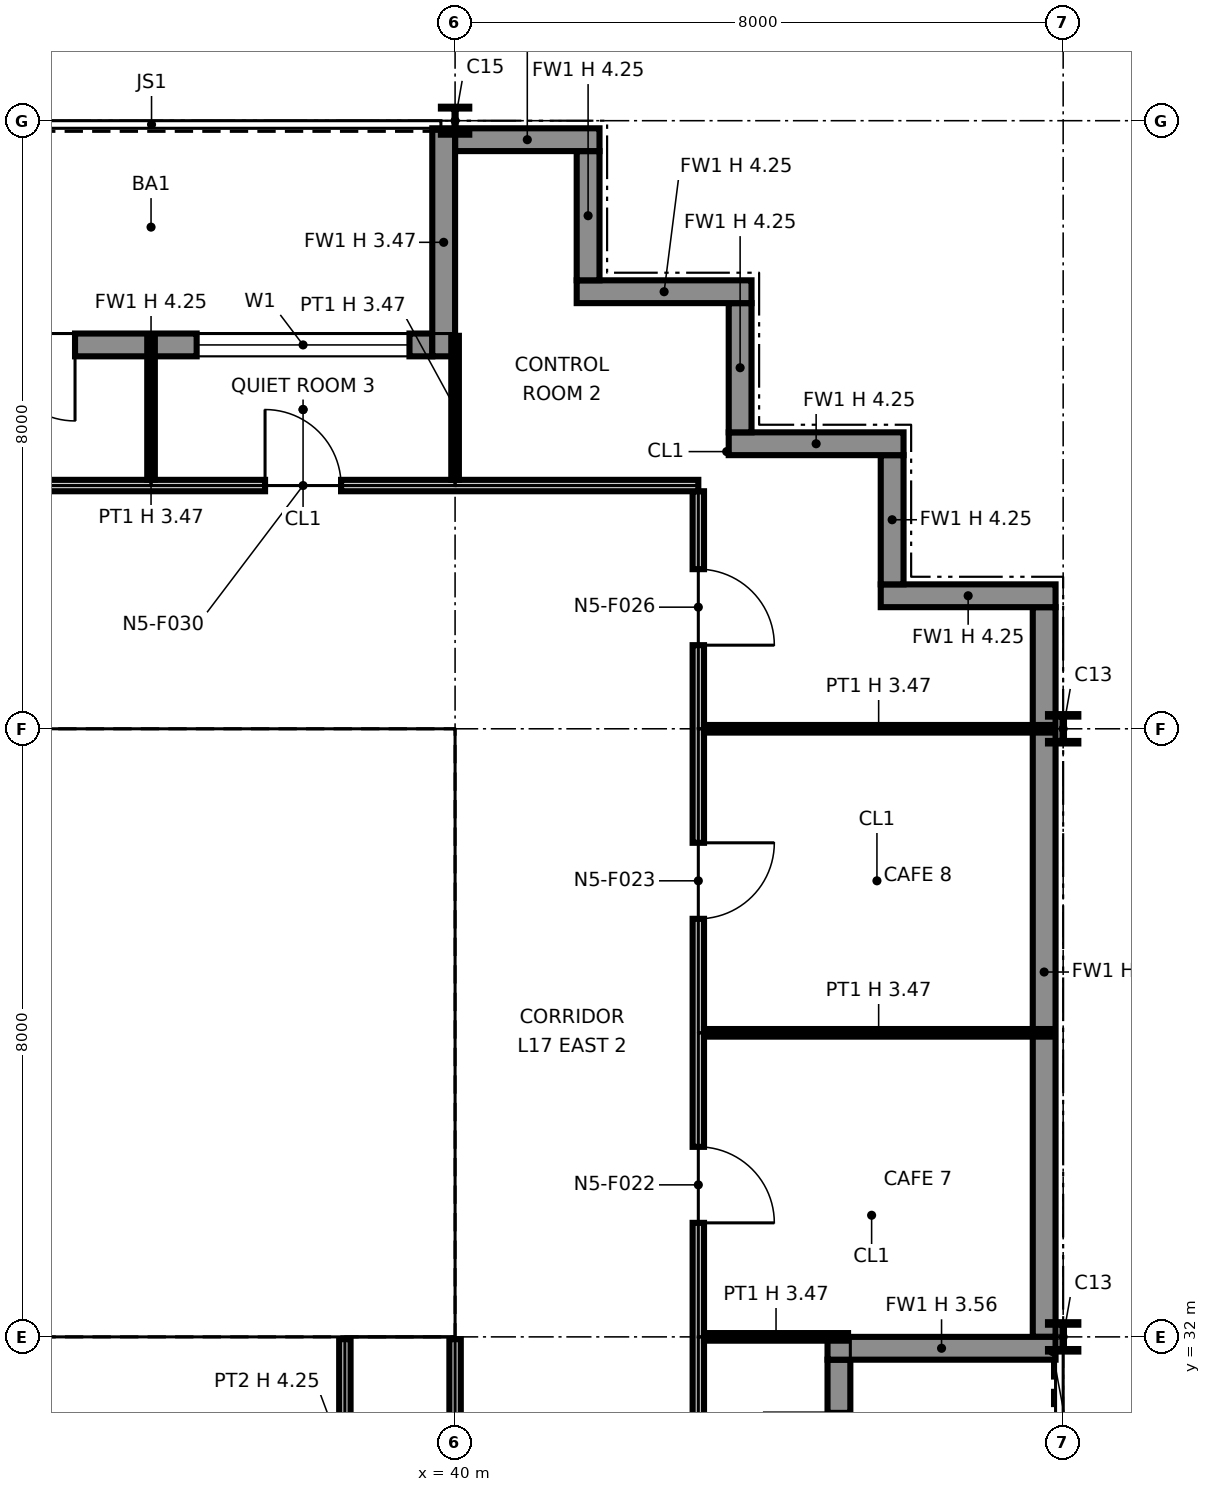
"""IFC4 building model, lengths in metres.
Left out: names, types, materials, properties, quantities, classifications, styles, units other than length and angle.
Written with IfcOpenShell. Run it as: python <this file> out.ifc"""

import sys

from ifc_helpers import new_model, si_unit, direction, frame, frame_2d, origin, origin_2d, place, context, subcontext, project, spatial, polyline, rectangle, i_section, outline, extrude, element, fill, save


model = new_model("IFC4")
c1 = context("Model", 3, precision=1e-05, world=origin(), true_north=direction((0.0, 1.0)))
c2 = subcontext(c1, "Body", "Model", "MODEL_VIEW")
j1 = project(units=[si_unit("LENGTHUNIT", "METRE"), si_unit("PLANEANGLEUNIT", "RADIAN")], contexts=[c1])
p1 = place(None, origin())
s1 = spatial("IfcSite", under=j1, at=p1, CompositionType="ELEMENT")
p2 = place(p1, origin())
s2 = spatial("IfcBuilding", under=s1, at=p2, CompositionType="ELEMENT")
p3 = place(p2, frame((0.0, 0.0, 92.0)))
s3 = spatial("IfcBuildingStorey", under=s2, at=p3, CompositionType="ELEMENT", Elevation=92.0)
for number, where, z_axis, x_axis in (
    (1, (40.0, 32.0, 0.0), (0.0, 0.0, 1.0), (1.0, 0.0, 0.0)),
    (2, (40.0, 40.0, 0.0), (0.0, 0.0, 1.0), (1.0, 0.0, 0.0)),
):
    element("IfcColumn", number, at=place(p3, frame(where, z_axis=z_axis, x_axis=x_axis)), inside=s3, PredefinedType="COLUMN", context=c2, shape_type="SweptSolid", body=[
        extrude(i_section(OverallWidth=0.257, OverallDepth=0.363, WebThickness=0.013, FlangeThickness=0.022, at=origin_2d()), origin(), (0.0, 0.0, 1.0), 4.25),
    ])
p4 = place(p3, frame((40.0, 48.0, 0.0), z_axis=(0.0, 0.0, 1.0), x_axis=(1.0, 0.0, 0.0)))
e3 = element("IfcColumn", 3, at=p4, inside=s3, PredefinedType="COLUMN", context=c2, shape_type="SweptSolid", body=[
    extrude(i_section(OverallWidth=0.373, OverallDepth=0.368, WebThickness=0.015, FlangeThickness=0.024, at=origin_2d()), origin(), (0.0, 0.0, 1.0), 4.25),
])
for number, where, z_axis, x_axis in (
    (4, (48.0, 32.0, 0.0), (0.0, 0.0, 1.0), (1.0, 0.0, 0.0)),
    (5, (48.0, 40.0, 0.0), (0.0, 0.0, 1.0), (1.0, 0.0, 0.0)),
):
    element("IfcColumn", number, at=place(p3, frame(where, z_axis=z_axis, x_axis=x_axis)), inside=s3, PredefinedType="COLUMN", context=c2, shape_type="SweptSolid", body=[
        extrude(i_section(OverallWidth=0.399, OverallDepth=0.386, WebThickness=0.021, FlangeThickness=0.033, at=origin_2d()), origin(), (0.0, 0.0, 1.0), 4.25),
    ])
p5 = place(p3, frame((45.05, 24.3, 0.0), z_axis=(0.0, 0.0, 1.0), x_axis=(0.0, 1.0, 0.0)))
e6 = element("IfcWall", 6, at=p5, inside=s3, PredefinedType="SOLIDWALL", context=c2, shape_type="SweptSolid", body=[
    extrude(rectangle(XDim=7.4, YDim=0.3, at=frame_2d((3.7, 0.0))), origin(), (0.0, 0.0, 1.0), 4.25),
])
p6 = place(p5, frame((0.3, 0.0, 0.9)))
e7 = element("IfcOpeningElement", 7, at=p6, cuts=e6, PredefinedType="OPENING", context=c2, shape_type="SweptSolid", body=[
    extrude(rectangle(XDim=2.8, YDim=2.2, at=frame_2d((1.4, 1.1))), frame((0.0, 0.16, 0.0), z_axis=(0.0, -1.0, 0.0), x_axis=(1.0, 0.0, 0.0)), (0.0, 0.0, 1.0), 0.32),
])
p7 = place(p5, frame((4.7, 0.0, 0.0)))
e8 = element("IfcOpeningElement", 8, at=p7, cuts=e6, PredefinedType="OPENING", context=c2, shape_type="SweptSolid", body=[
    extrude(rectangle(XDim=2.0, YDim=2.4, at=frame_2d((1.0, 1.2))), frame((0.0, 0.16, 0.0), z_axis=(0.0, -1.0, 0.0), x_axis=(1.0, 0.0, 0.0)), (0.0, 0.0, 1.0), 0.32),
])
p8 = place(p3, frame((47.9, 31.85, 0.0), z_axis=(0.0, 0.0, 1.0), x_axis=(-1.0, 0.0, 0.0)))
e9 = element("IfcWall", 9, at=p8, inside=s3, PredefinedType="SOLIDWALL", context=c2, shape_type="SweptSolid", body=[
    extrude(rectangle(XDim=3.0, YDim=0.3, at=frame_2d((1.5, 0.0))), origin(), (0.0, 0.0, 1.0), 3.556),
])
p9 = place(p3, frame((47.75, 32.0, 0.0), z_axis=(0.0, 0.0, 1.0), x_axis=(0.0, 1.0, 0.0)))
e10 = element("IfcWall", 10, at=p9, inside=s3, PredefinedType="SOLIDWALL", context=c2, shape_type="SweptSolid", body=[
    extrude(rectangle(XDim=9.6, YDim=0.3, at=frame_2d((4.8, 0.0))), origin(), (0.0, 0.0, 1.0), 4.25),
])
p10 = place(p3, frame((47.9, 41.75, 0.0), z_axis=(0.0, 0.0, 1.0), x_axis=(-1.0, 0.0, 0.0)))
e11 = element("IfcWall", 11, at=p10, inside=s3, PredefinedType="SOLIDWALL", context=c2, shape_type="SweptSolid", body=[
    extrude(rectangle(XDim=2.3, YDim=0.3, at=frame_2d((1.15, 0.0))), origin(), (0.0, 0.0, 1.0), 4.25),
])
p11 = place(p3, frame((45.75, 41.9, 0.0), z_axis=(0.0, 0.0, 1.0), x_axis=(0.0, 1.0, 0.0)))
e12 = element("IfcWall", 12, at=p11, inside=s3, PredefinedType="SOLIDWALL", context=c2, shape_type="SweptSolid", body=[
    extrude(rectangle(XDim=1.7, YDim=0.3, at=frame_2d((0.85, 0.0))), origin(), (0.0, 0.0, 1.0), 4.25),
])
p12 = place(p3, frame((45.9, 43.75, 0.0), z_axis=(0.0, 0.0, 1.0), x_axis=(-1.0, 0.0, 0.0)))
e13 = element("IfcWall", 13, at=p12, inside=s3, PredefinedType="SOLIDWALL", context=c2, shape_type="SweptSolid", body=[
    extrude(rectangle(XDim=2.3, YDim=0.3, at=frame_2d((1.15, 0.0))), origin(), (0.0, 0.0, 1.0), 4.25),
])
p13 = place(p3, frame((43.75, 43.9, 0.0), z_axis=(0.0, 0.0, 1.0), x_axis=(0.0, 1.0, 0.0)))
e14 = element("IfcWall", 14, at=p13, inside=s3, PredefinedType="SOLIDWALL", context=c2, shape_type="SweptSolid", body=[
    extrude(rectangle(XDim=1.7, YDim=0.3, at=frame_2d((0.85, 0.0))), origin(), (0.0, 0.0, 1.0), 4.25),
])
p14 = place(p3, frame((43.9, 45.75, 0.0), z_axis=(0.0, 0.0, 1.0), x_axis=(-1.0, 0.0, 0.0)))
e15 = element("IfcWall", 15, at=p14, inside=s3, PredefinedType="SOLIDWALL", context=c2, shape_type="SweptSolid", body=[
    extrude(rectangle(XDim=2.3, YDim=0.3, at=frame_2d((1.15, 0.0))), origin(), (0.0, 0.0, 1.0), 4.25),
])
p15 = place(p3, frame((41.75, 45.9, 0.0), z_axis=(0.0, 0.0, 1.0), x_axis=(0.0, 1.0, 0.0)))
e16 = element("IfcWall", 16, at=p15, inside=s3, PredefinedType="SOLIDWALL", context=c2, shape_type="SweptSolid", body=[
    extrude(rectangle(XDim=1.7, YDim=0.3, at=frame_2d((0.85, 0.0))), origin(), (0.0, 0.0, 1.0), 4.25),
])
p16 = place(p3, frame((41.9, 47.75, 0.0), z_axis=(0.0, 0.0, 1.0), x_axis=(-1.0, 0.0, 0.0)))
e17 = element("IfcWall", 17, at=p16, inside=s3, PredefinedType="SOLIDWALL", context=c2, shape_type="SweptSolid", body=[
    extrude(rectangle(XDim=1.9, YDim=0.3, at=frame_2d((0.95, 0.0))), origin(), (0.0, 0.0, 1.0), 4.25),
])
p17 = place(p3, frame((39.7, 45.05, 0.0), z_axis=(0.0, 0.0, 1.0), x_axis=(-1.0, 0.0, 0.0)))
e18 = element("IfcWall", 18, at=p17, inside=s3, PredefinedType="SOLIDWALL", context=c2, shape_type="SweptSolid", body=[
    extrude(rectangle(XDim=7.4, YDim=0.3, at=frame_2d((3.7, 0.0))), origin(), (0.0, 0.0, 1.0), 4.25),
])
p18 = place(p17, frame((0.3, 0.0, 0.9)))
e19 = element("IfcOpeningElement", 19, at=p18, cuts=e18, PredefinedType="OPENING", context=c2, shape_type="SweptSolid", body=[
    extrude(rectangle(XDim=2.8, YDim=2.2, at=frame_2d((1.4, 1.1))), frame((0.0, 0.16, 0.0), z_axis=(0.0, -1.0, 0.0), x_axis=(1.0, 0.0, 0.0)), (0.0, 0.0, 1.0), 0.32),
])
p19 = place(p17, frame((4.7, 0.0, 0.0)))
e20 = element("IfcOpeningElement", 20, at=p19, cuts=e18, PredefinedType="OPENING", context=c2, shape_type="SweptSolid", body=[
    extrude(rectangle(XDim=2.0, YDim=2.4, at=frame_2d((1.0, 1.2))), frame((0.0, 0.16, 0.0), z_axis=(0.0, -1.0, 0.0), x_axis=(1.0, 0.0, 0.0)), (0.0, 0.0, 1.0), 0.32),
])
p20 = place(p3, frame((39.85, 47.9, 0.0), z_axis=(0.0, 0.0, 1.0), x_axis=(0.0, -1.0, 0.0)))
e21 = element("IfcWall", 21, at=p20, inside=s3, PredefinedType="SOLIDWALL", context=c2, shape_type="SweptSolid", body=[
    extrude(rectangle(XDim=3.0, YDim=0.3, at=frame_2d((1.5, 0.0))), origin(), (0.0, 0.0, 1.0), 3.469),
])
p21 = place(p3, frame((24.65, 32.75, 0.0), z_axis=(0.0, 0.0, 1.0), x_axis=(1.0, 0.0, 0.0)))
e22 = element("IfcWall", 22, at=p21, inside=s3, PredefinedType="PARTITIONING", context=c2, shape_type="SweptSolid", body=[
    extrude(outline(polyline([(0.0, 0.0), (14.7, 0.0), (14.7, 4.25), (7.469, 4.25), (7.469, 3.632), (7.231, 3.632), (7.23, 4.25), (0.0, 4.25), (0.0, 0.0)])), frame((0.0, 0.1, 0.0), z_axis=(0.0, -1.0, 0.0), x_axis=(1.0, 0.0, 0.0)), (0.0, 0.0, 1.0), 0.2),
])
p22 = place(p21, frame((4.1, 0.0, 0.0)))
e23 = element("IfcOpeningElement", 23, at=p22, cuts=e22, PredefinedType="OPENING", context=c2, shape_type="SweptSolid", body=[
    extrude(rectangle(XDim=1.8, YDim=2.1, at=frame_2d((0.9, 1.05))), frame((0.0, 0.11, 0.0), z_axis=(0.0, -1.0, 0.0), x_axis=(1.0, 0.0, 0.0)), (0.0, 0.0, 1.0), 0.22),
])
p23 = place(p21, frame((8.55, 0.0, 0.0)))
e24 = element("IfcOpeningElement", 24, at=p23, cuts=e22, PredefinedType="OPENING", context=c2, shape_type="SweptSolid", body=[
    extrude(rectangle(XDim=1.4, YDim=2.1, at=frame_2d((0.7, 1.05))), frame((0.0, 0.11, 0.0), z_axis=(0.0, -1.0, 0.0), x_axis=(1.0, 0.0, 0.0)), (0.0, 0.0, 1.0), 0.22),
])
p24 = place(p21, frame((12.0, 0.0, 0.0)))
e25 = element("IfcOpeningElement", 25, at=p24, cuts=e22, PredefinedType="OPENING", context=c2, shape_type="SweptSolid", body=[
    extrude(rectangle(XDim=1.4, YDim=2.1, at=frame_2d((0.7, 1.05))), frame((0.0, 0.11, 0.0), z_axis=(0.0, -1.0, 0.0), x_axis=(1.0, 0.0, 0.0)), (0.0, 0.0, 1.0), 0.22),
])
p25 = place(p3, frame((24.65, 39.25, 0.0), z_axis=(0.0, 0.0, 1.0), x_axis=(1.0, 0.0, 0.0)))
e26 = element("IfcWall", 26, at=p25, inside=s3, PredefinedType="PARTITIONING", context=c2, shape_type="SweptSolid", body=[
    extrude(outline(polyline([(0.0, 0.0), (14.7, 0.0), (14.7, 4.25), (7.469, 4.25), (7.469, 3.632), (7.231, 3.632), (7.23, 4.25), (0.0, 4.25), (0.0, 0.0)])), frame((0.0, 0.1, 0.0), z_axis=(0.0, -1.0, 0.0), x_axis=(1.0, 0.0, 0.0)), (0.0, 0.0, 1.0), 0.2),
])
for number, where, z_axis, x_axis in (
    (27, (35.6, 32.85, 0.0), (0.0, 0.0, 1.0), (0.0, 1.0, 0.0)),
    (28, (39.25, 32.85, 0.0), (0.0, 0.0, 1.0), (0.0, 1.0, 0.0)),
):
    element("IfcWall", number, at=place(p3, frame(where, z_axis=z_axis, x_axis=x_axis)), inside=s3, PredefinedType="PARTITIONING", context=c2, shape_type="SweptSolid", body=[
        extrude(rectangle(XDim=6.3, YDim=0.2, at=frame_2d((3.15, 0.0))), origin(), (0.0, 0.0, 1.0), 4.25),
    ])
p26 = place(p3, frame((43.2, 16.0, 0.0), z_axis=(0.0, 0.0, 1.0), x_axis=(0.0, 1.0, 0.0)))
e29 = element("IfcWall", 29, at=p26, inside=s3, PredefinedType="PARTITIONING", context=c2, shape_type="SweptSolid", body=[
    extrude(outline(polyline([(0.0, 0.0), (27.125, 0.0), (27.125, 4.25), (24.3, 4.25), (24.298, 3.47), (23.702, 3.47), (23.7, 4.25), (20.3, 4.25), (20.298, 3.47), (19.702, 3.47), (19.7, 4.25), (16.3, 4.25), (16.298, 3.47), (15.702, 3.47), (15.7, 4.25), (12.3, 4.25), (12.298, 3.47), (11.702, 3.47), (11.7, 4.25), (8.3, 4.25), (8.298, 3.47), (7.702, 3.47), (7.7, 4.25), (4.3, 4.25), (4.298, 3.47), (3.702, 3.47), (3.7, 4.25), (0.0, 4.25), (0.0, 0.0)])), frame((0.0, 0.075, 0.0), z_axis=(0.0, -1.0, 0.0), x_axis=(1.0, 0.0, 0.0)), (0.0, 0.0, 1.0), 0.15),
])
p27 = place(p26, frame((2.5, 0.0, 0.0), z_axis=(0.0, 0.0, 1.0), x_axis=(-1.0, 0.0, 0.0)))
e30 = element("IfcOpeningElement", 30, at=p27, cuts=e29, PredefinedType="OPENING", context=c2, shape_type="SweptSolid", body=[
    extrude(rectangle(XDim=1.0, YDim=2.1, at=frame_2d((0.5, 1.05))), frame((0.0, 0.085, 0.0), z_axis=(0.0, -1.0, 0.0), x_axis=(1.0, 0.0, 0.0)), (0.0, 0.0, 1.0), 0.17),
])
p28 = place(p26, frame((12.5, 0.0, 0.0), z_axis=(0.0, 0.0, 1.0), x_axis=(-1.0, 0.0, 0.0)))
e31 = element("IfcOpeningElement", 31, at=p28, cuts=e29, PredefinedType="OPENING", context=c2, shape_type="SweptSolid", body=[
    extrude(rectangle(XDim=1.0, YDim=2.1, at=frame_2d((0.5, 1.05))), frame((0.0, 0.085, 0.0), z_axis=(0.0, -1.0, 0.0), x_axis=(1.0, 0.0, 0.0)), (0.0, 0.0, 1.0), 0.17),
])
p29 = place(p26, frame((18.5, 0.0, 0.0), z_axis=(0.0, 0.0, 1.0), x_axis=(-1.0, 0.0, 0.0)))
e32 = element("IfcOpeningElement", 32, at=p29, cuts=e29, PredefinedType="OPENING", context=c2, shape_type="SweptSolid", body=[
    extrude(rectangle(XDim=1.0, YDim=2.1, at=frame_2d((0.5, 1.05))), frame((0.0, 0.085, 0.0), z_axis=(0.0, -1.0, 0.0), x_axis=(1.0, 0.0, 0.0)), (0.0, 0.0, 1.0), 0.17),
])
p30 = place(p26, frame((22.5, 0.0, 0.0), z_axis=(0.0, 0.0, 1.0), x_axis=(-1.0, 0.0, 0.0)))
e33 = element("IfcOpeningElement", 33, at=p30, cuts=e29, PredefinedType="OPENING", context=c2, shape_type="SweptSolid", body=[
    extrude(rectangle(XDim=1.0, YDim=2.1, at=frame_2d((0.5, 1.05))), frame((0.0, 0.085, 0.0), z_axis=(0.0, -1.0, 0.0), x_axis=(1.0, 0.0, 0.0)), (0.0, 0.0, 1.0), 0.17),
])
p31 = place(p26, frame((26.1, 0.0, 0.0), z_axis=(0.0, 0.0, 1.0), x_axis=(-1.0, 0.0, 0.0)))
e34 = element("IfcOpeningElement", 34, at=p31, cuts=e29, PredefinedType="OPENING", context=c2, shape_type="SweptSolid", body=[
    extrude(rectangle(XDim=1.0, YDim=2.1, at=frame_2d((0.5, 1.05))), frame((0.0, 0.085, 0.0), z_axis=(0.0, -1.0, 0.0), x_axis=(1.0, 0.0, 0.0)), (0.0, 0.0, 1.0), 0.17),
])
p32 = place(p3, frame((40.0, 19.2, 0.0), z_axis=(0.0, 0.0, 1.0), x_axis=(0.0, 1.0, 0.0)))
e35 = element("IfcWall", 35, at=p32, inside=s3, PredefinedType="PARTITIONING", context=c2, shape_type="SweptSolid", body=[
    extrude(rectangle(XDim=12.77, YDim=0.15, at=frame_2d((6.385, 0.0))), origin(), (0.0, 0.0, 1.0), 3.47),
])
p33 = place(p32, frame((1.9, 0.0, 0.0)))
e36 = element("IfcOpeningElement", 36, at=p33, cuts=e35, PredefinedType="OPENING", context=c2, shape_type="SweptSolid", body=[
    extrude(rectangle(XDim=1.0, YDim=2.1, at=frame_2d((0.5, 1.05))), frame((0.0, 0.085, 0.0), z_axis=(0.0, -1.0, 0.0), x_axis=(1.0, 0.0, 0.0)), (0.0, 0.0, 1.0), 0.17),
])
p34 = place(p32, frame((6.3, 0.0, 0.0)))
e37 = element("IfcOpeningElement", 37, at=p34, cuts=e35, PredefinedType="OPENING", context=c2, shape_type="SweptSolid", body=[
    extrude(rectangle(XDim=1.0, YDim=2.1, at=frame_2d((0.5, 1.05))), frame((0.0, 0.085, 0.0), z_axis=(0.0, -1.0, 0.0), x_axis=(1.0, 0.0, 0.0)), (0.0, 0.0, 1.0), 0.17),
])
p35 = place(p32, frame((10.3, 0.0, 0.0)))
e38 = element("IfcOpeningElement", 38, at=p35, cuts=e35, PredefinedType="OPENING", context=c2, shape_type="SweptSolid", body=[
    extrude(rectangle(XDim=1.0, YDim=2.1, at=frame_2d((0.5, 1.05))), frame((0.0, 0.085, 0.0), z_axis=(0.0, -1.0, 0.0), x_axis=(1.0, 0.0, 0.0)), (0.0, 0.0, 1.0), 0.17),
])
p36 = place(p3, frame((38.55, 28.8, 0.0), z_axis=(0.0, 0.0, 1.0), x_axis=(0.0, 1.0, 0.0)))
e39 = element("IfcWall", 39, at=p36, inside=s3, PredefinedType="PARTITIONING", context=c2, shape_type="SweptSolid", body=[
    extrude(rectangle(XDim=3.17, YDim=0.15, at=frame_2d((1.585, 0.0))), origin(), (0.0, 0.0, 1.0), 4.25),
])
p37 = place(p3, frame((43.275, 32.0, 0.0), z_axis=(0.0, 0.0, 1.0), x_axis=(1.0, 0.0, 0.0)))
e40 = element("IfcWall", 40, at=p37, inside=s3, PredefinedType="PARTITIONING", context=c2, shape_type="SweptSolid", body=[
    extrude(rectangle(XDim=1.895, YDim=0.1, at=frame_2d((0.948, 0.0))), origin(), (0.0, 0.0, 1.0), 3.47),
])
for number, where, z_axis, x_axis in (
    (41, (43.275, 36.0, 0.0), (0.0, 0.0, 1.0), (1.0, 0.0, 0.0)),
    (42, (43.275, 40.0, 0.0), (0.0, 0.0, 1.0), (1.0, 0.0, 0.0)),
):
    element("IfcWall", number, at=place(p3, frame(where, z_axis=z_axis, x_axis=x_axis)), inside=s3, PredefinedType="PARTITIONING", context=c2, shape_type="SweptSolid", body=[
        extrude(rectangle(XDim=4.595, YDim=0.1, at=frame_2d((2.298, 0.0))), origin(), (0.0, 0.0, 1.0), 3.47),
    ])
p38 = place(p3, frame((8.05, 43.2, 0.0), z_axis=(0.0, 0.0, 1.0), x_axis=(1.0, 0.0, 0.0)))
e43 = element("IfcWall", 43, at=p38, inside=s3, PredefinedType="PARTITIONING", context=c2, shape_type="SweptSolid", body=[
    extrude(rectangle(XDim=35.15, YDim=0.15, at=frame_2d((17.575, 0.0))), origin(), (0.0, 0.0, 1.0), 4.25),
])
p39 = place(p38, frame((3.45, 0.0, 0.0)))
e44 = element("IfcOpeningElement", 44, at=p39, cuts=e43, PredefinedType="OPENING", context=c2, shape_type="SweptSolid", body=[
    extrude(rectangle(XDim=1.0, YDim=2.1, at=frame_2d((0.5, 1.05))), frame((0.0, 0.085, 0.0), z_axis=(0.0, -1.0, 0.0), x_axis=(1.0, 0.0, 0.0)), (0.0, 0.0, 1.0), 0.17),
])
p40 = place(p38, frame((11.45, 0.0, 0.0)))
e45 = element("IfcOpeningElement", 45, at=p40, cuts=e43, PredefinedType="OPENING", context=c2, shape_type="SweptSolid", body=[
    extrude(rectangle(XDim=1.0, YDim=2.1, at=frame_2d((0.5, 1.05))), frame((0.0, 0.085, 0.0), z_axis=(0.0, -1.0, 0.0), x_axis=(1.0, 0.0, 0.0)), (0.0, 0.0, 1.0), 0.17),
])
p41 = place(p38, frame((19.45, 0.0, 0.0)))
e46 = element("IfcOpeningElement", 46, at=p41, cuts=e43, PredefinedType="OPENING", context=c2, shape_type="SweptSolid", body=[
    extrude(rectangle(XDim=1.0, YDim=2.1, at=frame_2d((0.5, 1.05))), frame((0.0, 0.085, 0.0), z_axis=(0.0, -1.0, 0.0), x_axis=(1.0, 0.0, 0.0)), (0.0, 0.0, 1.0), 0.17),
])
p42 = place(p38, frame((29.45, 0.0, 0.0)))
e47 = element("IfcOpeningElement", 47, at=p42, cuts=e43, PredefinedType="OPENING", context=c2, shape_type="SweptSolid", body=[
    extrude(rectangle(XDim=1.0, YDim=2.1, at=frame_2d((0.5, 1.05))), frame((0.0, 0.085, 0.0), z_axis=(0.0, -1.0, 0.0), x_axis=(1.0, 0.0, 0.0)), (0.0, 0.0, 1.0), 0.17),
])
for number, where, z_axis, x_axis in (
    (48, (36.0, 43.275, 0.0), (0.0, 0.0, 1.0), (0.0, 1.0, 0.0)),
    (49, (40.0, 43.275, 0.0), (0.0, 0.0, 1.0), (0.0, 1.0, 0.0)),
):
    element("IfcWall", number, at=place(p3, frame(where, z_axis=z_axis, x_axis=x_axis)), inside=s3, PredefinedType="PARTITIONING", context=c2, shape_type="SweptSolid", body=[
        extrude(rectangle(XDim=1.895, YDim=0.1, at=frame_2d((0.948, 0.0))), origin(), (0.0, 0.0, 1.0), 3.47),
    ])
p43 = place(p18, origin())
e50 = element("IfcWindow", 50, at=p43, inside=s3, PartitioningType="SINGLE_PANEL", PredefinedType="WINDOW", context=c2, shape_type="SweptSolid", body=[
    extrude(rectangle(XDim=2.8, YDim=2.2, at=frame_2d((1.4, 1.1))), frame((0.0, 0.03, 0.0), z_axis=(0.0, -1.0, 0.0), x_axis=(1.0, 0.0, 0.0)), (0.0, 0.0, 1.0), 0.06),
])
fill(e19, e50)
p44 = place(p19, origin())
e51 = element("IfcDoor", 51, at=p44, inside=s3, OperationType="DOUBLE_DOOR_SINGLE_SWING", PredefinedType="DOOR", context=c2, shape_type="SweptSolid", body=[
    extrude(rectangle(XDim=2.0, YDim=2.4, at=frame_2d((1.0, 1.2))), frame((0.0, 0.025, 0.0), z_axis=(0.0, -1.0, 0.0), x_axis=(1.0, 0.0, 0.0)), (0.0, 0.0, 1.0), 0.05),
])
fill(e20, e51)
p45 = place(p24, origin())
e52 = element("IfcDoor", 52, at=p45, inside=s3, OperationType="DOUBLE_DOOR_SINGLE_SWING", PredefinedType="NOTDEFINED", context=c2, shape_type="SweptSolid", body=[
    extrude(rectangle(XDim=1.4, YDim=2.1, at=frame_2d((0.7, 1.05))), frame((0.0, 0.025, 0.0), z_axis=(0.0, -1.0, 0.0), x_axis=(1.0, 0.0, 0.0)), (0.0, 0.0, 1.0), 0.05),
])
fill(e25, e52)
p46 = place(p29, origin())
e53 = element("IfcDoor", 53, at=p46, inside=s3, OperationType="SINGLE_SWING_RIGHT", PredefinedType="DOOR", context=c2, shape_type="SweptSolid", body=[
    extrude(rectangle(XDim=1.0, YDim=2.1, at=frame_2d((0.5, 1.05))), frame((0.0, 0.025, 0.0), z_axis=(0.0, -1.0, 0.0), x_axis=(1.0, 0.0, 0.0)), (0.0, 0.0, 1.0), 0.05),
])
fill(e32, e53)
p47 = place(p30, origin())
e54 = element("IfcDoor", 54, at=p47, inside=s3, OperationType="SINGLE_SWING_LEFT", PredefinedType="DOOR", context=c2, shape_type="SweptSolid", body=[
    extrude(rectangle(XDim=1.0, YDim=2.1, at=frame_2d((0.5, 1.05))), frame((0.0, 0.025, 0.0), z_axis=(0.0, -1.0, 0.0), x_axis=(1.0, 0.0, 0.0)), (0.0, 0.0, 1.0), 0.05),
])
fill(e33, e54)
p48 = place(p31, origin())
e55 = element("IfcDoor", 55, at=p48, inside=s3, OperationType="SINGLE_SWING_RIGHT", PredefinedType="DOOR", context=c2, shape_type="SweptSolid", body=[
    extrude(rectangle(XDim=1.0, YDim=2.1, at=frame_2d((0.5, 1.05))), frame((0.0, 0.025, 0.0), z_axis=(0.0, -1.0, 0.0), x_axis=(1.0, 0.0, 0.0)), (0.0, 0.0, 1.0), 0.05),
])
fill(e34, e55)
p49 = place(p42, origin())
e56 = element("IfcDoor", 56, at=p49, inside=s3, OperationType="SINGLE_SWING_LEFT", PredefinedType="DOOR", context=c2, shape_type="SweptSolid", body=[
    extrude(rectangle(XDim=1.0, YDim=2.1, at=frame_2d((0.5, 1.05))), frame((0.0, 0.025, 0.0), z_axis=(0.0, -1.0, 0.0), x_axis=(1.0, 0.0, 0.0)), (0.0, 0.0, 1.0), 0.05),
])
fill(e47, e56)
save(model, sys.argv[1])
